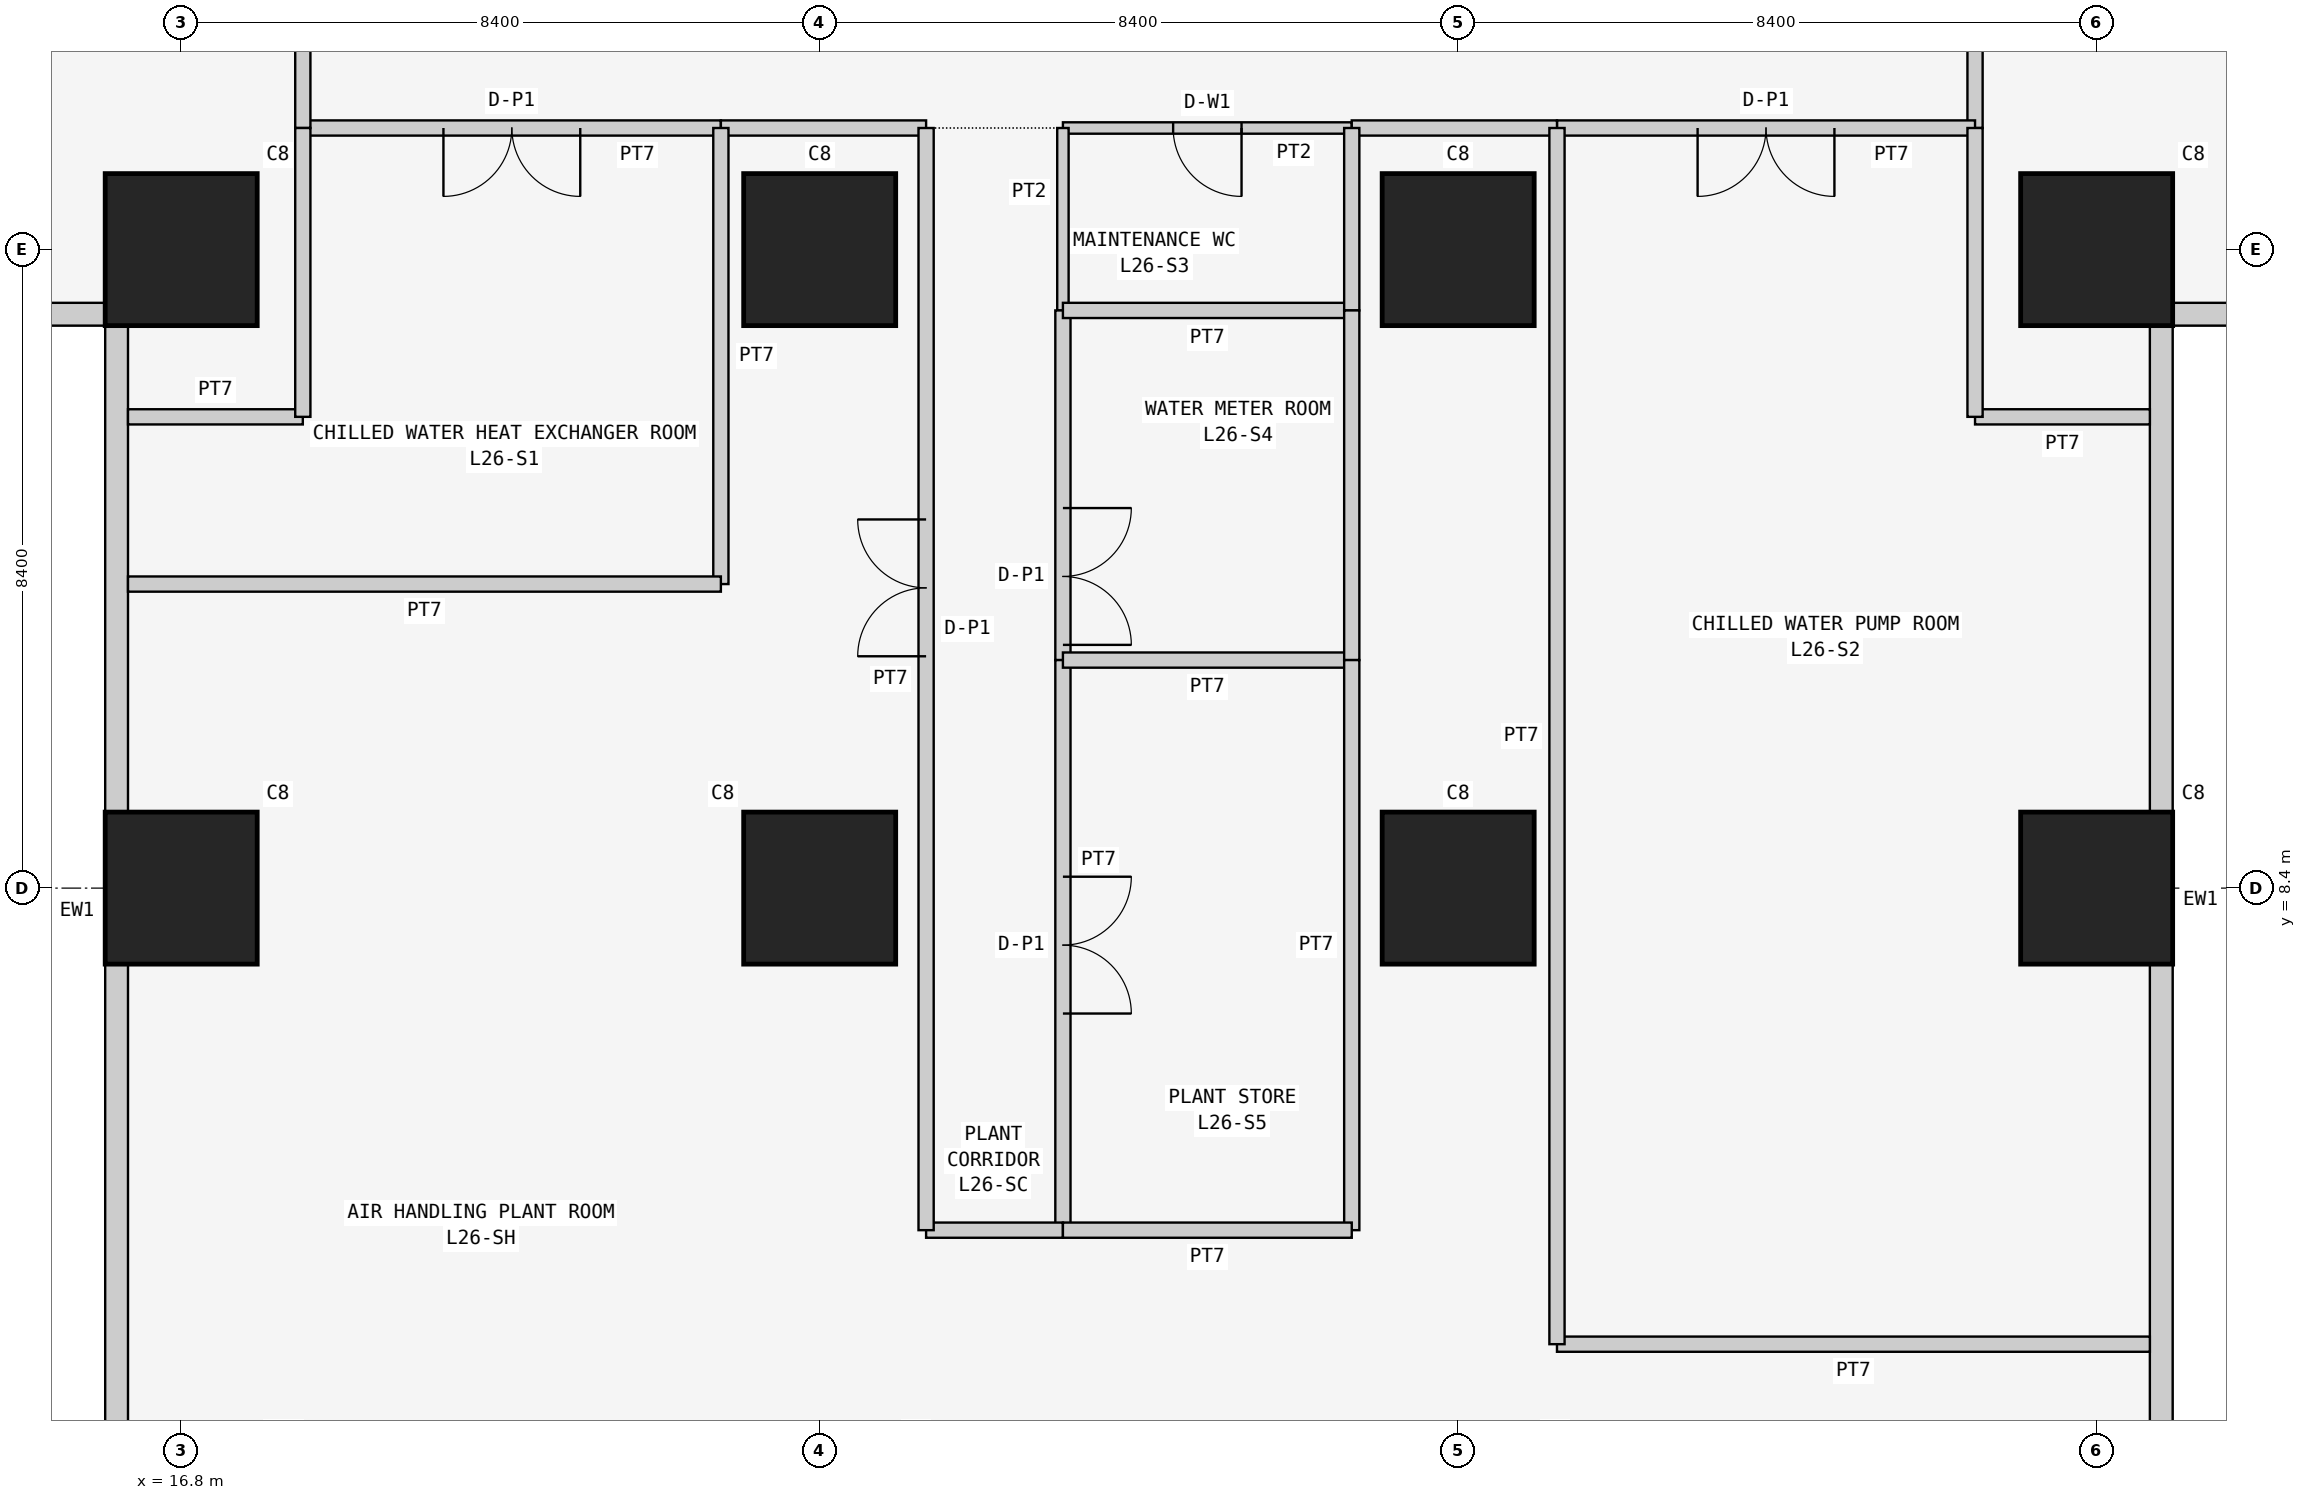
"""IFC4 building model, lengths in metres.
Left out: names, types, materials, properties, quantities, classifications, styles, units other than length and angle.
Written with IfcOpenShell. Run it as: python <this file> out.ifc"""

import sys

from ifc_helpers import new_model, si_unit, direction, frame, frame_2d, origin, origin_2d, place, context, subcontext, project, spatial, rectangle, extrude, element, fill, save


model = new_model("IFC4")
c1 = context("Model", 3, precision=1e-05, world=origin(), true_north=direction((0.0, 1.0)))
c2 = subcontext(c1, "Body", "Model", "MODEL_VIEW")
j1 = project(units=[si_unit("LENGTHUNIT", "METRE"), si_unit("PLANEANGLEUNIT", "RADIAN")], contexts=[c1])
p1 = place(None, origin())
s1 = spatial("IfcSite", under=j1, at=p1, CompositionType="ELEMENT")
p2 = place(p1, origin())
s2 = spatial("IfcBuilding", under=s1, at=p2, CompositionType="ELEMENT")
p3 = place(p2, frame((0.0, 0.0, 102.9)))
s3 = spatial("IfcBuildingStorey", under=s2, at=p3, CompositionType="ELEMENT", Elevation=102.9)
for number, where, z_axis, x_axis in (
    (1, (16.8, 8.4, 0.0), (0.0, 0.0, 1.0), (1.0, 0.0, 0.0)),
    (2, (16.8, 16.8, 0.0), (0.0, 0.0, 1.0), (1.0, 0.0, 0.0)),
    (3, (25.2, 8.4, 0.0), (0.0, 0.0, 1.0), (1.0, 0.0, 0.0)),
    (4, (25.2, 16.8, 0.0), (0.0, 0.0, 1.0), (1.0, 0.0, 0.0)),
    (5, (33.6, 8.4, 0.0), (0.0, 0.0, 1.0), (1.0, 0.0, 0.0)),
    (6, (33.6, 16.8, 0.0), (0.0, 0.0, 1.0), (1.0, 0.0, 0.0)),
    (7, (42.0, 8.4, 0.0), (0.0, 0.0, 1.0), (1.0, 0.0, 0.0)),
    (8, (42.0, 16.8, 0.0), (0.0, 0.0, 1.0), (1.0, 0.0, 0.0)),
):
    element("IfcColumn", number, at=place(p3, frame(where, z_axis=z_axis, x_axis=x_axis)), inside=s3, PredefinedType="COLUMN", context=c2, shape_type="SweptSolid", body=[
        extrude(rectangle(XDim=2.0, YDim=2.0, at=origin_2d()), origin(), (0.0, 0.0, 1.0), 6.0),
    ])
p4 = place(p3, frame((0.4, 15.95, 0.0), z_axis=(0.0, 0.0, 1.0), x_axis=(1.0, 0.0, 0.0)))
e9 = element("IfcWall", 9, at=p4, inside=s3, PredefinedType="SOLIDWALL", context=c2, shape_type="SweptSolid", body=[
    extrude(rectangle(XDim=15.7, YDim=0.3, at=frame_2d((7.85, 0.0))), origin(), (0.0, 0.0, 1.0), 5.85),
])
p5 = place(p3, frame((15.95, 15.8, 0.0), z_axis=(0.0, 0.0, 1.0), x_axis=(0.0, -1.0, 0.0)))
e10 = element("IfcWall", 10, at=p5, inside=s3, PredefinedType="SOLIDWALL", context=c2, shape_type="SweptSolid", body=[
    extrude(rectangle(XDim=15.4, YDim=0.3, at=frame_2d((7.7, 0.0))), origin(), (0.0, 0.0, 1.0), 5.85),
])
p6 = place(p3, frame((42.85, 0.4, 0.0), z_axis=(0.0, 0.0, 1.0), x_axis=(0.0, 1.0, 0.0)))
e11 = element("IfcWall", 11, at=p6, inside=s3, PredefinedType="SOLIDWALL", context=c2, shape_type="SweptSolid", body=[
    extrude(rectangle(XDim=15.7, YDim=0.3, at=frame_2d((7.85, 0.0))), origin(), (0.0, 0.0, 1.0), 5.85),
])
p7 = place(p3, frame((43.0, 15.95, 0.0), z_axis=(0.0, 0.0, 1.0), x_axis=(1.0, 0.0, 0.0)))
e12 = element("IfcWall", 12, at=p7, inside=s3, PredefinedType="SOLIDWALL", context=c2, shape_type="SweptSolid", body=[
    extrude(rectangle(XDim=15.4, YDim=0.3, at=frame_2d((7.7, 0.0))), origin(), (0.0, 0.0, 1.0), 5.85),
])
p8 = place(p3, frame((40.4, 23.9, 0.0), z_axis=(0.0, 0.0, 1.0), x_axis=(0.0, -1.0, 0.0)))
e13 = element("IfcWall", 13, at=p8, inside=s3, PredefinedType="PARTITIONING", context=c2, shape_type="SweptSolid", body=[
    extrude(rectangle(XDim=5.5, YDim=0.2, at=frame_2d((2.75, 0.0))), origin(), (0.0, 0.0, 1.0), 5.85),
])
p9 = place(p8, frame((1.85, 0.0, 0.0)))
e14 = element("IfcOpeningElement", 14, at=p9, cuts=e13, PredefinedType="OPENING", context=c2, shape_type="SweptSolid", body=[
    extrude(rectangle(XDim=1.8, YDim=2.4, at=frame_2d((0.9, 1.2))), frame((0.0, 0.11, 0.0), z_axis=(0.0, -1.0, 0.0), x_axis=(1.0, 0.0, 0.0)), (0.0, 0.0, 1.0), 0.22),
])
p10 = place(p3, frame((23.9, 18.4, 0.0), z_axis=(0.0, 0.0, 1.0), x_axis=(-1.0, 0.0, 0.0)))
e15 = element("IfcWall", 15, at=p10, inside=s3, PredefinedType="PARTITIONING", context=c2, shape_type="SweptSolid", body=[
    extrude(rectangle(XDim=5.5, YDim=0.2, at=frame_2d((2.75, 0.0))), origin(), (0.0, 0.0, 1.0), 5.85),
])
p11 = place(p10, frame((1.85, 0.0, 0.0)))
e16 = element("IfcOpeningElement", 16, at=p11, cuts=e15, PredefinedType="OPENING", context=c2, shape_type="SweptSolid", body=[
    extrude(rectangle(XDim=1.8, YDim=2.4, at=frame_2d((0.9, 1.2))), frame((0.0, 0.11, 0.0), z_axis=(0.0, -1.0, 0.0), x_axis=(1.0, 0.0, 0.0)), (0.0, 0.0, 1.0), 0.22),
])
p12 = place(p3, frame((40.4, 18.4, 0.0), z_axis=(0.0, 0.0, 1.0), x_axis=(-1.0, 0.0, 0.0)))
e17 = element("IfcWall", 17, at=p12, inside=s3, PredefinedType="PARTITIONING", context=c2, shape_type="SweptSolid", body=[
    extrude(rectangle(XDim=5.5, YDim=0.2, at=frame_2d((2.75, 0.0))), origin(), (0.0, 0.0, 1.0), 5.85),
])
p13 = place(p12, frame((1.85, 0.0, 0.0)))
e18 = element("IfcOpeningElement", 18, at=p13, cuts=e17, PredefinedType="OPENING", context=c2, shape_type="SweptSolid", body=[
    extrude(rectangle(XDim=1.8, YDim=2.4, at=frame_2d((0.9, 1.2))), frame((0.0, 0.11, 0.0), z_axis=(0.0, -1.0, 0.0), x_axis=(1.0, 0.0, 0.0)), (0.0, 0.0, 1.0), 0.22),
])
p14 = place(p3, frame((32.2, 18.4, 0.0), z_axis=(0.0, 0.0, 1.0), x_axis=(-1.0, 0.0, 0.0)))
e19 = element("IfcWall", 19, at=p14, inside=s3, PredefinedType="PARTITIONING", context=c2, shape_type="SweptSolid", body=[
    extrude(rectangle(XDim=3.8, YDim=0.15, at=frame_2d((1.9, 0.0))), origin(), (0.0, 0.0, 1.0), 5.85),
])
p15 = place(p14, frame((1.45, 0.0, 0.0)))
e20 = element("IfcOpeningElement", 20, at=p15, cuts=e19, PredefinedType="OPENING", context=c2, shape_type="SweptSolid", body=[
    extrude(rectangle(XDim=0.9, YDim=2.1, at=frame_2d((0.45, 1.05))), frame((0.0, 0.085, 0.0), z_axis=(0.0, -1.0, 0.0), x_axis=(1.0, 0.0, 0.0)), (0.0, 0.0, 1.0), 0.17),
])
p16 = place(p3, frame((26.6, 18.4, 0.0), z_axis=(0.0, 0.0, 1.0), x_axis=(-1.0, 0.0, 0.0)))
e21 = element("IfcWall", 21, at=p16, inside=s3, PredefinedType="PARTITIONING", context=c2, shape_type="SweptSolid", body=[
    extrude(rectangle(XDim=2.7, YDim=0.2, at=frame_2d((1.35, 0.0))), origin(), (0.0, 0.0, 1.0), 5.85),
])
p17 = place(p3, frame((34.9, 18.4, 0.0), z_axis=(0.0, 0.0, 1.0), x_axis=(-1.0, 0.0, 0.0)))
e22 = element("IfcWall", 22, at=p17, inside=s3, PredefinedType="PARTITIONING", context=c2, shape_type="SweptSolid", body=[
    extrude(rectangle(XDim=2.7, YDim=0.2, at=frame_2d((1.35, 0.0))), origin(), (0.0, 0.0, 1.0), 5.85),
])
p18 = place(p3, frame((18.4, 18.4, 0.0), z_axis=(0.0, 0.0, 1.0), x_axis=(0.0, 1.0, 0.0)))
e23 = element("IfcWall", 23, at=p18, inside=s3, PredefinedType="PARTITIONING", context=c2, shape_type="SweptSolid", body=[
    extrude(rectangle(XDim=5.5, YDim=0.2, at=frame_2d((2.75, 0.0))), origin(), (0.0, 0.0, 1.0), 5.85),
])
p19 = place(p18, frame((1.85, 0.0, 0.0)))
e24 = element("IfcOpeningElement", 24, at=p19, cuts=e23, PredefinedType="OPENING", context=c2, shape_type="SweptSolid", body=[
    extrude(rectangle(XDim=1.8, YDim=2.4, at=frame_2d((0.9, 1.2))), frame((0.0, 0.11, 0.0), z_axis=(0.0, -1.0, 0.0), x_axis=(1.0, 0.0, 0.0)), (0.0, 0.0, 1.0), 0.22),
])
p20 = place(p3, frame((42.7, 14.6, 0.0), z_axis=(0.0, 0.0, 1.0), x_axis=(-1.0, 0.0, 0.0)))
e25 = element("IfcWall", 25, at=p20, inside=s3, PredefinedType="PARTITIONING", context=c2, shape_type="SweptSolid", body=[
    extrude(rectangle(XDim=2.3, YDim=0.2, at=frame_2d((1.15, 0.0))), origin(), (0.0, 0.0, 1.0), 5.85),
])
p21 = place(p3, frame((40.4, 14.6, 0.0), z_axis=(0.0, 0.0, 1.0), x_axis=(0.0, 1.0, 0.0)))
e26 = element("IfcWall", 26, at=p21, inside=s3, PredefinedType="PARTITIONING", context=c2, shape_type="SweptSolid", body=[
    extrude(rectangle(XDim=3.8, YDim=0.2, at=frame_2d((1.9, 0.0))), origin(), (0.0, 0.0, 1.0), 5.85),
])
p22 = place(p3, frame((23.9, 18.4, 0.0), z_axis=(0.0, 0.0, 1.0), x_axis=(0.0, -1.0, 0.0)))
e27 = element("IfcWall", 27, at=p22, inside=s3, PredefinedType="PARTITIONING", context=c2, shape_type="SweptSolid", body=[
    extrude(rectangle(XDim=6.0, YDim=0.2, at=frame_2d((3.0, 0.0))), origin(), (0.0, 0.0, 1.0), 5.85),
])
p23 = place(p3, frame((23.9, 12.4, 0.0), z_axis=(0.0, 0.0, 1.0), x_axis=(-1.0, 0.0, 0.0)))
e28 = element("IfcWall", 28, at=p23, inside=s3, PredefinedType="PARTITIONING", context=c2, shape_type="SweptSolid", body=[
    extrude(rectangle(XDim=7.8, YDim=0.2, at=frame_2d((3.9, 0.0))), origin(), (0.0, 0.0, 1.0), 5.85),
])
p24 = place(p3, frame((16.1, 14.6, 0.0), z_axis=(0.0, 0.0, 1.0), x_axis=(1.0, 0.0, 0.0)))
e29 = element("IfcWall", 29, at=p24, inside=s3, PredefinedType="PARTITIONING", context=c2, shape_type="SweptSolid", body=[
    extrude(rectangle(XDim=2.3, YDim=0.2, at=frame_2d((1.15, 0.0))), origin(), (0.0, 0.0, 1.0), 5.85),
])
p25 = place(p3, frame((18.4, 14.6, 0.0), z_axis=(0.0, 0.0, 1.0), x_axis=(0.0, 1.0, 0.0)))
e30 = element("IfcWall", 30, at=p25, inside=s3, PredefinedType="PARTITIONING", context=c2, shape_type="SweptSolid", body=[
    extrude(rectangle(XDim=3.8, YDim=0.2, at=frame_2d((1.9, 0.0))), origin(), (0.0, 0.0, 1.0), 5.85),
])
p26 = place(p3, frame((42.7, 2.4, 0.0), z_axis=(0.0, 0.0, 1.0), x_axis=(-1.0, 0.0, 0.0)))
e31 = element("IfcWall", 31, at=p26, inside=s3, PredefinedType="PARTITIONING", context=c2, shape_type="SweptSolid", body=[
    extrude(rectangle(XDim=7.8, YDim=0.2, at=frame_2d((3.9, 0.0))), origin(), (0.0, 0.0, 1.0), 5.75),
])
p27 = place(p3, frame((34.9, 2.4, 0.0), z_axis=(0.0, 0.0, 1.0), x_axis=(0.0, 1.0, 0.0)))
e32 = element("IfcWall", 32, at=p27, inside=s3, PredefinedType="PARTITIONING", context=c2, shape_type="SweptSolid", body=[
    extrude(rectangle(XDim=16.0, YDim=0.2, at=frame_2d((8.0, 0.0))), origin(), (0.0, 0.0, 1.0), 5.75),
])
p28 = place(p3, frame((28.4, 18.4, 0.0), z_axis=(0.0, 0.0, 1.0), x_axis=(0.0, -1.0, 0.0)))
e33 = element("IfcWall", 33, at=p28, inside=s3, PredefinedType="PARTITIONING", context=c2, shape_type="SweptSolid", body=[
    extrude(rectangle(XDim=2.4, YDim=0.15, at=frame_2d((1.2, 0.0))), origin(), (0.0, 0.0, 1.0), 5.85),
])
p29 = place(p3, frame((28.4, 16.0, 0.0), z_axis=(0.0, 0.0, 1.0), x_axis=(0.0, -1.0, 0.0)))
e34 = element("IfcWall", 34, at=p29, inside=s3, PredefinedType="PARTITIONING", context=c2, shape_type="SweptSolid", body=[
    extrude(rectangle(XDim=4.6, YDim=0.2, at=frame_2d((2.3, 0.0))), origin(), (0.0, 0.0, 1.0), 5.85),
])
p30 = place(p29, frame((2.6, 0.0, 0.0)))
e35 = element("IfcOpeningElement", 35, at=p30, cuts=e34, PredefinedType="OPENING", context=c2, shape_type="SweptSolid", body=[
    extrude(rectangle(XDim=1.8, YDim=2.4, at=frame_2d((0.9, 1.2))), frame((0.0, 0.11, 0.0), z_axis=(0.0, -1.0, 0.0), x_axis=(1.0, 0.0, 0.0)), (0.0, 0.0, 1.0), 0.22),
])
p31 = place(p3, frame((28.4, 11.4, 0.0), z_axis=(0.0, 0.0, 1.0), x_axis=(0.0, -1.0, 0.0)))
e36 = element("IfcWall", 36, at=p31, inside=s3, PredefinedType="PARTITIONING", context=c2, shape_type="SweptSolid", body=[
    extrude(rectangle(XDim=7.5, YDim=0.2, at=frame_2d((3.75, 0.0))), origin(), (0.0, 0.0, 1.0), 5.75),
])
p32 = place(p31, frame((2.85, 0.0, 0.0)))
e37 = element("IfcOpeningElement", 37, at=p32, cuts=e36, PredefinedType="OPENING", context=c2, shape_type="SweptSolid", body=[
    extrude(rectangle(XDim=1.8, YDim=2.4, at=frame_2d((0.9, 1.2))), frame((0.0, 0.11, 0.0), z_axis=(0.0, -1.0, 0.0), x_axis=(1.0, 0.0, 0.0)), (0.0, 0.0, 1.0), 0.22),
])
p33 = place(p3, frame((28.4, 3.9, 0.0), z_axis=(0.0, 0.0, 1.0), x_axis=(-1.0, 0.0, 0.0)))
e38 = element("IfcWall", 38, at=p33, inside=s3, PredefinedType="PARTITIONING", context=c2, shape_type="SweptSolid", body=[
    extrude(rectangle(XDim=1.8, YDim=0.2, at=frame_2d((0.9, 0.0))), origin(), (0.0, 0.0, 1.0), 5.75),
])
p34 = place(p3, frame((26.6, 3.9, 0.0), z_axis=(0.0, 0.0, 1.0), x_axis=(0.0, 1.0, 0.0)))
e39 = element("IfcWall", 39, at=p34, inside=s3, PredefinedType="PARTITIONING", context=c2, shape_type="SweptSolid", body=[
    extrude(rectangle(XDim=14.5, YDim=0.2, at=frame_2d((7.25, 0.0))), origin(), (0.0, 0.0, 1.0), 5.75),
])
p35 = place(p34, frame((7.55, 0.0, 0.0)))
e40 = element("IfcOpeningElement", 40, at=p35, cuts=e39, PredefinedType="OPENING", context=c2, shape_type="SweptSolid", body=[
    extrude(rectangle(XDim=1.8, YDim=2.4, at=frame_2d((0.9, 1.2))), frame((0.0, 0.11, 0.0), z_axis=(0.0, -1.0, 0.0), x_axis=(1.0, 0.0, 0.0)), (0.0, 0.0, 1.0), 0.22),
])
p36 = place(p3, frame((32.2, 16.0, 0.0), z_axis=(0.0, 0.0, 1.0), x_axis=(-1.0, 0.0, 0.0)))
e41 = element("IfcWall", 41, at=p36, inside=s3, PredefinedType="PARTITIONING", context=c2, shape_type="SweptSolid", body=[
    extrude(rectangle(XDim=3.8, YDim=0.2, at=frame_2d((1.9, 0.0))), origin(), (0.0, 0.0, 1.0), 5.85),
])
p37 = place(p3, frame((32.2, 18.4, 0.0), z_axis=(0.0, 0.0, 1.0), x_axis=(0.0, -1.0, 0.0)))
e42 = element("IfcWall", 42, at=p37, inside=s3, PredefinedType="PARTITIONING", context=c2, shape_type="SweptSolid", body=[
    extrude(rectangle(XDim=2.4, YDim=0.2, at=frame_2d((1.2, 0.0))), origin(), (0.0, 0.0, 1.0), 5.85),
])
p38 = place(p3, frame((32.2, 11.4, 0.0), z_axis=(0.0, 0.0, 1.0), x_axis=(-1.0, 0.0, 0.0)))
e43 = element("IfcWall", 43, at=p38, inside=s3, PredefinedType="PARTITIONING", context=c2, shape_type="SweptSolid", body=[
    extrude(rectangle(XDim=3.8, YDim=0.2, at=frame_2d((1.9, 0.0))), origin(), (0.0, 0.0, 1.0), 5.85),
])
p39 = place(p3, frame((32.2, 16.0, 0.0), z_axis=(0.0, 0.0, 1.0), x_axis=(0.0, -1.0, 0.0)))
e44 = element("IfcWall", 44, at=p39, inside=s3, PredefinedType="PARTITIONING", context=c2, shape_type="SweptSolid", body=[
    extrude(rectangle(XDim=4.6, YDim=0.2, at=frame_2d((2.3, 0.0))), origin(), (0.0, 0.0, 1.0), 5.85),
])
p40 = place(p3, frame((32.2, 11.4, 0.0), z_axis=(0.0, 0.0, 1.0), x_axis=(0.0, -1.0, 0.0)))
e45 = element("IfcWall", 45, at=p40, inside=s3, PredefinedType="PARTITIONING", context=c2, shape_type="SweptSolid", body=[
    extrude(rectangle(XDim=7.5, YDim=0.2, at=frame_2d((3.75, 0.0))), origin(), (0.0, 0.0, 1.0), 5.75),
])
p41 = place(p3, frame((32.2, 3.9, 0.0), z_axis=(0.0, 0.0, 1.0), x_axis=(-1.0, 0.0, 0.0)))
e46 = element("IfcWall", 46, at=p41, inside=s3, PredefinedType="PARTITIONING", context=c2, shape_type="SweptSolid", body=[
    extrude(rectangle(XDim=3.8, YDim=0.2, at=frame_2d((1.9, 0.0))), origin(), (0.0, 0.0, 1.0), 5.75),
])
p42 = place(p11, origin())
e47 = element("IfcDoor", 47, at=p42, inside=s3, OperationType="DOUBLE_DOOR_SINGLE_SWING", PredefinedType="DOOR", context=c2, shape_type="SweptSolid", body=[
    extrude(rectangle(XDim=1.8, YDim=2.4, at=frame_2d((0.9, 1.2))), frame((0.0, 0.025, 0.0), z_axis=(0.0, -1.0, 0.0), x_axis=(1.0, 0.0, 0.0)), (0.0, 0.0, 1.0), 0.05),
])
fill(e16, e47)
p43 = place(p13, origin())
e48 = element("IfcDoor", 48, at=p43, inside=s3, OperationType="DOUBLE_DOOR_SINGLE_SWING", PredefinedType="DOOR", context=c2, shape_type="SweptSolid", body=[
    extrude(rectangle(XDim=1.8, YDim=2.4, at=frame_2d((0.9, 1.2))), frame((0.0, 0.025, 0.0), z_axis=(0.0, -1.0, 0.0), x_axis=(1.0, 0.0, 0.0)), (0.0, 0.0, 1.0), 0.05),
])
fill(e18, e48)
p44 = place(p15, origin())
e49 = element("IfcDoor", 49, at=p44, inside=s3, OperationType="SINGLE_SWING_LEFT", PredefinedType="DOOR", context=c2, shape_type="SweptSolid", body=[
    extrude(rectangle(XDim=0.9, YDim=2.1, at=frame_2d((0.45, 1.05))), frame((0.0, 0.025, 0.0), z_axis=(0.0, -1.0, 0.0), x_axis=(1.0, 0.0, 0.0)), (0.0, 0.0, 1.0), 0.05),
])
fill(e20, e49)
p45 = place(p30, origin())
e50 = element("IfcDoor", 50, at=p45, inside=s3, OperationType="DOUBLE_DOOR_SINGLE_SWING", PredefinedType="DOOR", context=c2, shape_type="SweptSolid", body=[
    extrude(rectangle(XDim=1.8, YDim=2.4, at=frame_2d((0.9, 1.2))), frame((0.0, 0.025, 0.0), z_axis=(0.0, -1.0, 0.0), x_axis=(1.0, 0.0, 0.0)), (0.0, 0.0, 1.0), 0.05),
])
fill(e35, e50)
p46 = place(p32, origin())
e51 = element("IfcDoor", 51, at=p46, inside=s3, OperationType="DOUBLE_DOOR_SINGLE_SWING", PredefinedType="DOOR", context=c2, shape_type="SweptSolid", body=[
    extrude(rectangle(XDim=1.8, YDim=2.4, at=frame_2d((0.9, 1.2))), frame((0.0, 0.025, 0.0), z_axis=(0.0, -1.0, 0.0), x_axis=(1.0, 0.0, 0.0)), (0.0, 0.0, 1.0), 0.05),
])
fill(e37, e51)
p47 = place(p35, origin())
e52 = element("IfcDoor", 52, at=p47, inside=s3, OperationType="DOUBLE_DOOR_SINGLE_SWING", PredefinedType="DOOR", context=c2, shape_type="SweptSolid", body=[
    extrude(rectangle(XDim=1.8, YDim=2.4, at=frame_2d((0.9, 1.2))), frame((0.0, 0.025, 0.0), z_axis=(0.0, -1.0, 0.0), x_axis=(1.0, 0.0, 0.0)), (0.0, 0.0, 1.0), 0.05),
])
fill(e40, e52)
save(model, sys.argv[1])
